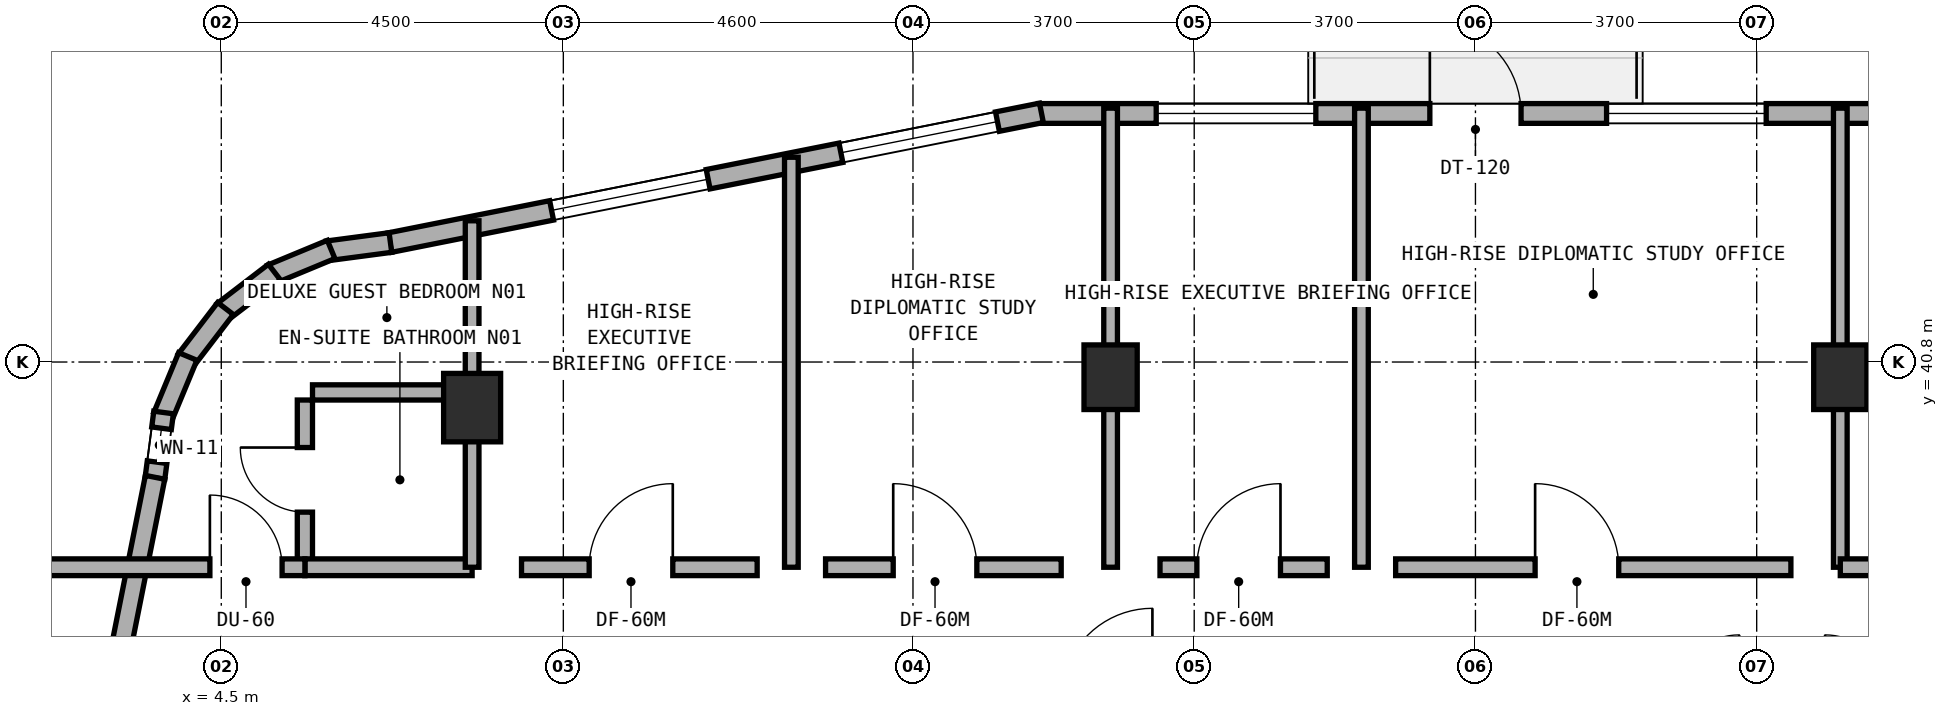
"""IFC4 building model, lengths in metres.
Left out: names, types, materials, properties, quantities, classifications, styles, units other than length and angle.
Written with IfcOpenShell. Run it as: python <this file> out.ifc"""

import sys

from ifc_helpers import new_model, si_unit, direction, frame, frame_2d, origin, origin_2d, place, context, subcontext, project, spatial, rectangle, extrude, element, fill, save


model = new_model("IFC4")
c1 = context("Model", 3, precision=1e-05, world=origin(), true_north=direction((0.0, 1.0)))
c2 = subcontext(c1, "Body", "Model", "MODEL_VIEW")
j1 = project(units=[si_unit("LENGTHUNIT", "METRE"), si_unit("PLANEANGLEUNIT", "RADIAN")], contexts=[c1])
p1 = place(None, origin())
s1 = spatial("IfcSite", under=j1, at=p1, CompositionType="ELEMENT")
p2 = place(p1, origin())
s2 = spatial("IfcBuilding", under=s1, at=p2, CompositionType="ELEMENT")
p3 = place(p2, frame((0.0, 0.0, 231.5)))
s3 = spatial("IfcBuildingStorey", under=s2, at=p3, CompositionType="ELEMENT", Elevation=231.5)
for number, where, z_axis, x_axis in (
    (1, (16.2, 40.6, 0.0), (0.0, 0.0, 1.0), (1.0, 0.0, 0.0)),
    (2, (25.8, 40.6, 0.0), (0.0, 0.0, 1.0), (1.0, 0.0, 0.0)),
):
    element("IfcColumn", number, at=place(p3, frame(where, z_axis=z_axis, x_axis=x_axis)), inside=s3, PredefinedType="COLUMN", context=c2, shape_type="SweptSolid", body=[
        extrude(rectangle(XDim=0.7, YDim=0.85, at=origin_2d()), origin(), (0.0, 0.0, 1.0), 3.6),
    ])
p4 = place(p3, frame((7.8, 40.2, 0.0), z_axis=(0.0, 0.0, 1.0), x_axis=(1.0, 0.0, 0.0)))
e3 = element("IfcColumn", 3, at=p4, inside=s3, PredefinedType="COLUMN", context=c2, shape_type="SweptSolid", body=[
    extrude(rectangle(XDim=0.75, YDim=0.9, at=origin_2d()), origin(), (0.0, 0.0, 1.0), 3.6),
])
p5 = place(p3, frame((26.785, 44.07, 0.0), z_axis=(0.0, 0.0, 1.0), x_axis=(-1.0, 0.0, 0.0)))
e4 = element("IfcWall", 4, at=p5, inside=s3, PredefinedType="STANDARD", context=c2, shape_type="SweptSolid", body=[
    extrude(rectangle(XDim=11.535, YDim=0.26, at=frame_2d((5.768, 0.0))), origin(), (0.0, 0.0, 1.0), 3.32),
])
p6 = place(p5, frame((5.185, 0.0, 0.0)))
e5 = element("IfcOpeningElement", 5, at=p6, cuts=e4, PredefinedType="OPENING", context=c2, shape_type="SweptSolid", body=[
    extrude(rectangle(XDim=1.2, YDim=2.15, at=frame_2d((0.6, 1.075))), frame((0.0, 0.14, 0.0), z_axis=(0.0, -1.0, 0.0), x_axis=(1.0, 0.0, 0.0)), (0.0, 0.0, 1.0), 0.28),
])
p7 = place(p5, frame((1.96, 0.0, 0.85)))
e6 = element("IfcOpeningElement", 6, at=p7, cuts=e4, PredefinedType="OPENING", context=c2, shape_type="SweptSolid", body=[
    extrude(rectangle(XDim=2.1, YDim=1.5, at=frame_2d((1.05, 0.75))), frame((0.0, 0.14, 0.0), z_axis=(0.0, -1.0, 0.0), x_axis=(1.0, 0.0, 0.0)), (0.0, 0.0, 1.0), 0.28),
])
p8 = place(p5, frame((7.885, 0.0, 0.85)))
e7 = element("IfcOpeningElement", 7, at=p8, cuts=e4, PredefinedType="OPENING", context=c2, shape_type="SweptSolid", body=[
    extrude(rectangle(XDim=2.1, YDim=1.5, at=frame_2d((1.05, 0.75))), frame((0.0, 0.14, 0.0), z_axis=(0.0, -1.0, 0.0), x_axis=(1.0, 0.0, 0.0)), (0.0, 0.0, 1.0), 0.28),
])
p9 = place(p3, frame((15.29, 44.078, 0.0), z_axis=(0.0, 0.0, 1.0), x_axis=(-0.980752174324, -0.195256683773, 0.0)))
e8 = element("IfcWall", 8, at=p9, inside=s3, PredefinedType="STANDARD", context=c2, shape_type="SweptSolid", body=[
    extrude(rectangle(XDim=8.741, YDim=0.26, at=frame_2d((4.371, 0.0))), origin(), (0.0, 0.0, 1.0), 3.32),
])
p10 = place(p9, frame((0.59, 0.0, 0.85)))
e9 = element("IfcOpeningElement", 9, at=p10, cuts=e8, PredefinedType="OPENING", context=c2, shape_type="SweptSolid", body=[
    extrude(rectangle(XDim=2.1, YDim=1.5, at=frame_2d((1.05, 0.75))), frame((0.0, 0.14, 0.0), z_axis=(0.0, -1.0, 0.0), x_axis=(1.0, 0.0, 0.0)), (0.0, 0.0, 1.0), 0.28),
])
p11 = place(p9, frame((4.471, 0.0, 0.85)))
e10 = element("IfcOpeningElement", 10, at=p11, cuts=e8, PredefinedType="OPENING", context=c2, shape_type="SweptSolid", body=[
    extrude(rectangle(XDim=2.1, YDim=1.5, at=frame_2d((1.05, 0.75))), frame((0.0, 0.14, 0.0), z_axis=(0.0, -1.0, 0.0), x_axis=(1.0, 0.0, 0.0)), (0.0, 0.0, 1.0), 0.28),
])
p12 = place(p3, frame((6.725, 42.372, 0.0), z_axis=(0.0, 0.0, 1.0), x_axis=(-0.9913883573, -0.130954667764, 0.0)))
e11 = element("IfcWall", 11, at=p12, inside=s3, PredefinedType="STANDARD", context=c2, shape_type="SweptSolid", body=[
    extrude(rectangle(XDim=0.833, YDim=0.26, at=frame_2d((0.417, 0.0))), origin(), (0.0, 0.0, 1.0), 3.32),
])
p13 = place(p3, frame((5.945, 42.281, 0.0), z_axis=(0.0, 0.0, 1.0), x_axis=(-0.923754491172, -0.382985169477, 0.0)))
e12 = element("IfcWall", 12, at=p13, inside=s3, PredefinedType="STANDARD", context=c2, shape_type="SweptSolid", body=[
    extrude(rectangle(XDim=0.851, YDim=0.26, at=frame_2d((0.426, 0.0))), origin(), (0.0, 0.0, 1.0), 3.32),
])
for number, where, z_axis, x_axis in (
    (13, (5.199, 41.983, 0.0), (0.0, 0.0, 1.0), (-0.794, -0.608, 0.0)),
    (14, (4.555, 41.504, 0.0), (0.0, 0.0, 1.0), (-0.608, -0.794, 0.0)),
):
    element("IfcWall", number, at=place(p3, frame(where, z_axis=z_axis, x_axis=x_axis)), inside=s3, PredefinedType="STANDARD", context=c2, shape_type="SweptSolid", body=[
        extrude(rectangle(XDim=0.85, YDim=0.26, at=frame_2d((0.425, 0.0))), origin(), (0.0, 0.0, 1.0), 3.32),
    ])
p14 = place(p3, frame((4.059, 40.873, 0.0), z_axis=(0.0, 0.0, 1.0), x_axis=(-0.383229930484, -0.923652976167, 0.0)))
e15 = element("IfcWall", 15, at=p14, inside=s3, PredefinedType="STANDARD", context=c2, shape_type="SweptSolid", body=[
    extrude(rectangle(XDim=0.851, YDim=0.26, at=frame_2d((0.426, 0.0))), origin(), (0.0, 0.0, 1.0), 3.32),
])
p15 = place(p3, frame((3.741, 40.136, 0.0), z_axis=(0.0, 0.0, 1.0), x_axis=(-0.130156359936, -0.991493480548, 0.0)))
e16 = element("IfcWall", 16, at=p15, inside=s3, PredefinedType="STANDARD", context=c2, shape_type="SweptSolid", body=[
    extrude(rectangle(XDim=0.868, YDim=0.26, at=frame_2d((0.434, 0.0))), origin(), (0.0, 0.0, 1.0), 3.32),
])
p16 = place(p15, frame((0.209, 0.0, 0.85)))
e17 = element("IfcOpeningElement", 17, at=p16, cuts=e16, PredefinedType="OPENING", context=c2, shape_type="SweptSolid", body=[
    extrude(rectangle(XDim=0.45, YDim=1.5, at=frame_2d((0.225, 0.75))), frame((0.0, 0.14, 0.0), z_axis=(0.0, -1.0, 0.0), x_axis=(1.0, 0.0, 0.0)), (0.0, 0.0, 1.0), 0.28),
])
p17 = place(p3, frame((3.629, 39.283, 0.0), z_axis=(0.0, 0.0, 1.0), x_axis=(-0.195291715883, -0.980745199176, 0.0)))
e18 = element("IfcWall", 18, at=p17, inside=s3, PredefinedType="STANDARD", context=c2, shape_type="SweptSolid", body=[
    extrude(rectangle(XDim=8.771, YDim=0.26, at=frame_2d((4.385, 0.0))), origin(), (0.0, 0.0, 1.0), 3.32),
])
p18 = place(p17, frame((4.0, 0.0, 0.85)))
e19 = element("IfcOpeningElement", 19, at=p18, cuts=e18, PredefinedType="OPENING", context=c2, shape_type="SweptSolid", body=[
    extrude(rectangle(XDim=2.1, YDim=1.5, at=frame_2d((1.05, 0.75))), frame((0.0, 0.14, 0.0), z_axis=(0.0, -1.0, 0.0), x_axis=(1.0, 0.0, 0.0)), (0.0, 0.0, 1.0), 0.28),
])
p19 = place(p3, frame((5.6, 38.2, 0.0), z_axis=(0.0, 0.0, 1.0), x_axis=(0.0, 1.0, 0.0)))
e20 = element("IfcWall", 20, at=p19, inside=s3, PredefinedType="PLUMBINGWALL", context=c2, shape_type="SweptSolid", body=[
    extrude(rectangle(XDim=2.1, YDim=0.2, at=frame_2d((1.05, 0.0))), origin(), (0.0, 0.0, 1.0), 3.32),
])
p20 = place(p19, frame((0.625, 0.0, 0.0)))
e21 = element("IfcOpeningElement", 21, at=p20, cuts=e20, PredefinedType="OPENING", context=c2, shape_type="SweptSolid", body=[
    extrude(rectangle(XDim=0.85, YDim=2.1, at=frame_2d((0.425, 1.05))), frame((0.0, 0.11, 0.0), z_axis=(0.0, -1.0, 0.0), x_axis=(1.0, 0.0, 0.0)), (0.0, 0.0, 1.0), 0.22),
])
p21 = place(p3, frame((5.7, 40.4, 0.0), z_axis=(0.0, 0.0, 1.0), x_axis=(1.0, 0.0, 0.0)))
e22 = element("IfcWall", 22, at=p21, inside=s3, PredefinedType="PLUMBINGWALL", context=c2, shape_type="SweptSolid", body=[
    extrude(rectangle(XDim=2.0, YDim=0.2, at=frame_2d((1.0, 0.0))), origin(), (0.0, 0.0, 1.0), 3.32),
])
p22 = place(p3, frame((5.6, 38.1, 0.0), z_axis=(0.0, 0.0, 1.0), x_axis=(1.0, 0.0, 0.0)))
e23 = element("IfcWall", 23, at=p22, inside=s3, PredefinedType="SOLIDWALL", context=c2, shape_type="SweptSolid", body=[
    extrude(rectangle(XDim=2.2, YDim=0.22, at=frame_2d((1.1, 0.0))), origin(), (0.0, 0.0, 1.0), 2.745),
])
p23 = place(p3, frame((1.96, 38.1, 0.0), z_axis=(0.0, 0.0, 1.0), x_axis=(1.0, 0.0, 0.0)))
e24 = element("IfcWall", 24, at=p23, inside=s3, PredefinedType="SOLIDWALL", context=c2, shape_type="SweptSolid", body=[
    extrude(rectangle(XDim=3.64, YDim=0.22, at=frame_2d((1.82, 0.0))), origin(), (0.0, 0.0, 1.0), 3.32),
])
p24 = place(p23, frame((2.39, 0.0, 0.0)))
e25 = element("IfcOpeningElement", 25, at=p24, cuts=e24, PredefinedType="OPENING", context=c2, shape_type="SweptSolid", body=[
    extrude(rectangle(XDim=0.95, YDim=2.1, at=frame_2d((0.475, 1.05))), frame((0.0, 0.12, 0.0), z_axis=(0.0, -1.0, 0.0), x_axis=(1.0, 0.0, 0.0)), (0.0, 0.0, 1.0), 0.24),
])
p25 = place(p3, frame((7.8, 38.1, 0.0), z_axis=(0.0, 0.0, 1.0), x_axis=(0.0, 1.0, 0.0)))
e26 = element("IfcWall", 26, at=p25, inside=s3, PredefinedType="SOLIDWALL", context=c2, shape_type="SweptSolid", body=[
    extrude(rectangle(XDim=4.558, YDim=0.18, at=frame_2d((2.279, 0.0))), origin(), (0.0, 0.0, 1.0), 2.745),
])
p26 = place(p3, frame((12.0, 38.1, 0.0), z_axis=(0.0, 0.0, 1.0), x_axis=(0.0, 1.0, 0.0)))
e27 = element("IfcWall", 27, at=p26, inside=s3, PredefinedType="SOLIDWALL", context=c2, shape_type="SweptSolid", body=[
    extrude(rectangle(XDim=5.394, YDim=0.18, at=frame_2d((2.697, 0.0))), origin(), (0.0, 0.0, 1.0), 2.895),
])
p27 = place(p3, frame((8.45, 38.1, 0.0), z_axis=(0.0, 0.0, 1.0), x_axis=(1.0, 0.0, 0.0)))
e28 = element("IfcWall", 28, at=p27, inside=s3, PredefinedType="SOLIDWALL", context=c2, shape_type="SweptSolid", body=[
    extrude(rectangle(XDim=3.1, YDim=0.22, at=frame_2d((1.55, 0.0))), origin(), (0.0, 0.0, 1.0), 3.32),
])
p28 = place(p27, frame((0.89, 0.0, 0.0)))
e29 = element("IfcOpeningElement", 29, at=p28, cuts=e28, PredefinedType="OPENING", context=c2, shape_type="SweptSolid", body=[
    extrude(rectangle(XDim=1.1, YDim=2.1, at=frame_2d((0.55, 1.05))), frame((0.0, 0.12, 0.0), z_axis=(0.0, -1.0, 0.0), x_axis=(1.0, 0.0, 0.0)), (0.0, 0.0, 1.0), 0.24),
])
p29 = place(p3, frame((12.45, 38.1, 0.0), z_axis=(0.0, 0.0, 1.0), x_axis=(1.0, 0.0, 0.0)))
e30 = element("IfcWall", 30, at=p29, inside=s3, PredefinedType="SOLIDWALL", context=c2, shape_type="SweptSolid", body=[
    extrude(rectangle(XDim=3.1, YDim=0.22, at=frame_2d((1.55, 0.0))), origin(), (0.0, 0.0, 1.0), 3.32),
])
p30 = place(p29, frame((0.89, 0.0, 0.0)))
e31 = element("IfcOpeningElement", 31, at=p30, cuts=e30, PredefinedType="OPENING", context=c2, shape_type="SweptSolid", body=[
    extrude(rectangle(XDim=1.1, YDim=2.1, at=frame_2d((0.55, 1.05))), frame((0.0, 0.12, 0.0), z_axis=(0.0, -1.0, 0.0), x_axis=(1.0, 0.0, 0.0)), (0.0, 0.0, 1.0), 0.24),
])
p31 = place(p3, frame((16.2, 38.1, 0.0), z_axis=(0.0, 0.0, 1.0), x_axis=(0.0, 1.0, 0.0)))
e32 = element("IfcWall", 32, at=p31, inside=s3, PredefinedType="SOLIDWALL", context=c2, shape_type="SweptSolid", body=[
    extrude(rectangle(XDim=6.04, YDim=0.18, at=frame_2d((3.02, 0.0))), origin(), (0.0, 0.0, 1.0), 2.745),
])
p32 = place(p3, frame((19.5, 38.1, 0.0), z_axis=(0.0, 0.0, 1.0), x_axis=(0.0, 1.0, 0.0)))
e33 = element("IfcWall", 33, at=p32, inside=s3, PredefinedType="SOLIDWALL", context=c2, shape_type="SweptSolid", body=[
    extrude(rectangle(XDim=6.04, YDim=0.18, at=frame_2d((3.02, 0.0))), origin(), (0.0, 0.0, 1.0), 2.895),
])
p33 = place(p3, frame((16.85, 38.1, 0.0), z_axis=(0.0, 0.0, 1.0), x_axis=(1.0, 0.0, 0.0)))
e34 = element("IfcWall", 34, at=p33, inside=s3, PredefinedType="SOLIDWALL", context=c2, shape_type="SweptSolid", body=[
    extrude(rectangle(XDim=2.2, YDim=0.22, at=frame_2d((1.1, 0.0))), origin(), (0.0, 0.0, 1.0), 3.32),
])
p34 = place(p33, frame((0.485, 0.0, 0.0)))
e35 = element("IfcOpeningElement", 35, at=p34, cuts=e34, PredefinedType="OPENING", context=c2, shape_type="SweptSolid", body=[
    extrude(rectangle(XDim=1.1, YDim=2.1, at=frame_2d((0.55, 1.05))), frame((0.0, 0.12, 0.0), z_axis=(0.0, -1.0, 0.0), x_axis=(1.0, 0.0, 0.0)), (0.0, 0.0, 1.0), 0.24),
])
p35 = place(p3, frame((19.95, 38.1, 0.0), z_axis=(0.0, 0.0, 1.0), x_axis=(1.0, 0.0, 0.0)))
e36 = element("IfcWall", 36, at=p35, inside=s3, PredefinedType="SOLIDWALL", context=c2, shape_type="SweptSolid", body=[
    extrude(rectangle(XDim=5.2, YDim=0.22, at=frame_2d((2.6, 0.0))), origin(), (0.0, 0.0, 1.0), 3.32),
])
p36 = place(p35, frame((1.835, 0.0, 0.0)))
e37 = element("IfcOpeningElement", 37, at=p36, cuts=e36, PredefinedType="OPENING", context=c2, shape_type="SweptSolid", body=[
    extrude(rectangle(XDim=1.1, YDim=2.1, at=frame_2d((0.55, 1.05))), frame((0.0, 0.12, 0.0), z_axis=(0.0, -1.0, 0.0), x_axis=(1.0, 0.0, 0.0)), (0.0, 0.0, 1.0), 0.24),
])
p37 = place(p3, frame((25.8, 38.1, 0.0), z_axis=(0.0, 0.0, 1.0), x_axis=(0.0, 1.0, 0.0)))
e38 = element("IfcWall", 38, at=p37, inside=s3, PredefinedType="SOLIDWALL", context=c2, shape_type="SweptSolid", body=[
    extrude(rectangle(XDim=6.04, YDim=0.18, at=frame_2d((3.02, 0.0))), origin(), (0.0, 0.0, 1.0), 2.745),
])
p38 = place(p3, frame((25.8, 38.1, 0.0), z_axis=(0.0, 0.0, 1.0), x_axis=(1.0, 0.0, 0.0)))
e39 = element("IfcWall", 39, at=p38, inside=s3, PredefinedType="SOLIDWALL", context=c2, shape_type="SweptSolid", body=[
    extrude(rectangle(XDim=5.05, YDim=0.22, at=frame_2d((2.525, 0.0))), origin(), (0.0, 0.0, 1.0), 2.745),
])
p39 = place(p38, frame((2.05, 0.0, 0.0)))
e40 = element("IfcOpeningElement", 40, at=p39, cuts=e39, PredefinedType="OPENING", context=c2, shape_type="SweptSolid", body=[
    extrude(rectangle(XDim=0.95, YDim=2.1, at=frame_2d((0.475, 1.05))), frame((0.0, 0.12, 0.0), z_axis=(0.0, -1.0, 0.0), x_axis=(1.0, 0.0, 0.0)), (0.0, 0.0, 1.0), 0.24),
])
p40 = place(p6, frame((1.2, 0.0, 0.0), z_axis=(0.0, 0.0, 1.0), x_axis=(-1.0, 0.0, 0.0)))
e41 = element("IfcDoor", 41, at=p40, inside=s3, OperationType="SINGLE_SWING_LEFT", PredefinedType="DOOR", context=c2, shape_type="SweptSolid", body=[
    extrude(rectangle(XDim=1.2, YDim=2.15, at=frame_2d((0.6, 1.075))), frame((0.0, 0.025, 0.0), z_axis=(0.0, -1.0, 0.0), x_axis=(1.0, 0.0, 0.0)), (0.0, 0.0, 1.0), 0.05),
])
fill(e5, e41)
p41 = place(p7, origin())
e42 = element("IfcWindow", 42, at=p41, inside=s3, PartitioningType="SINGLE_PANEL", PredefinedType="WINDOW", context=c2, shape_type="SweptSolid", body=[
    extrude(rectangle(XDim=2.1, YDim=1.5, at=frame_2d((1.05, 0.75))), frame((0.0, 0.03, 0.0), z_axis=(0.0, -1.0, 0.0), x_axis=(1.0, 0.0, 0.0)), (0.0, 0.0, 1.0), 0.06),
])
fill(e6, e42)
p42 = place(p8, origin())
e43 = element("IfcWindow", 43, at=p42, inside=s3, PartitioningType="SINGLE_PANEL", PredefinedType="WINDOW", context=c2, shape_type="SweptSolid", body=[
    extrude(rectangle(XDim=2.1, YDim=1.5, at=frame_2d((1.05, 0.75))), frame((0.0, 0.03, 0.0), z_axis=(0.0, -1.0, 0.0), x_axis=(1.0, 0.0, 0.0)), (0.0, 0.0, 1.0), 0.06),
])
fill(e7, e43)
p43 = place(p10, origin())
e44 = element("IfcWindow", 44, at=p43, inside=s3, PartitioningType="SINGLE_PANEL", PredefinedType="WINDOW", context=c2, shape_type="SweptSolid", body=[
    extrude(rectangle(XDim=2.1, YDim=1.5, at=frame_2d((1.05, 0.75))), frame((0.0, 0.03, 0.0), z_axis=(0.0, -1.0, 0.0), x_axis=(1.0, 0.0, 0.0)), (0.0, 0.0, 1.0), 0.06),
])
fill(e9, e44)
p44 = place(p11, origin())
e45 = element("IfcWindow", 45, at=p44, inside=s3, PartitioningType="SINGLE_PANEL", PredefinedType="WINDOW", context=c2, shape_type="SweptSolid", body=[
    extrude(rectangle(XDim=2.1, YDim=1.5, at=frame_2d((1.05, 0.75))), frame((0.0, 0.03, 0.0), z_axis=(0.0, -1.0, 0.0), x_axis=(1.0, 0.0, 0.0)), (0.0, 0.0, 1.0), 0.06),
])
fill(e10, e45)
p45 = place(p16, origin())
e46 = element("IfcWindow", 46, at=p45, inside=s3, PartitioningType="SINGLE_PANEL", PredefinedType="WINDOW", context=c2, shape_type="SweptSolid", body=[
    extrude(rectangle(XDim=0.45, YDim=1.5, at=frame_2d((0.225, 0.75))), frame((0.0, 0.03, 0.0), z_axis=(0.0, -1.0, 0.0), x_axis=(1.0, 0.0, 0.0)), (0.0, 0.0, 1.0), 0.06),
])
fill(e17, e46)
p46 = place(p20, origin())
e47 = element("IfcDoor", 47, at=p46, inside=s3, OperationType="SINGLE_SWING_RIGHT", PredefinedType="DOOR", context=c2, shape_type="SweptSolid", body=[
    extrude(rectangle(XDim=0.85, YDim=2.1, at=frame_2d((0.425, 1.05))), frame((0.0, 0.025, 0.0), z_axis=(0.0, -1.0, 0.0), x_axis=(1.0, 0.0, 0.0)), (0.0, 0.0, 1.0), 0.05),
])
fill(e21, e47)
p47 = place(p24, origin())
e48 = element("IfcDoor", 48, at=p47, inside=s3, OperationType="SINGLE_SWING_LEFT", PredefinedType="DOOR", context=c2, shape_type="SweptSolid", body=[
    extrude(rectangle(XDim=0.95, YDim=2.1, at=frame_2d((0.475, 1.05))), frame((0.0, 0.025, 0.0), z_axis=(0.0, -1.0, 0.0), x_axis=(1.0, 0.0, 0.0)), (0.0, 0.0, 1.0), 0.05),
])
fill(e25, e48)
p48 = place(p28, origin())
e49 = element("IfcDoor", 49, at=p48, inside=s3, OperationType="SINGLE_SWING_RIGHT", PredefinedType="DOOR", context=c2, shape_type="SweptSolid", body=[
    extrude(rectangle(XDim=1.1, YDim=2.1, at=frame_2d((0.55, 1.05))), frame((0.0, 0.025, 0.0), z_axis=(0.0, -1.0, 0.0), x_axis=(1.0, 0.0, 0.0)), (0.0, 0.0, 1.0), 0.05),
])
fill(e29, e49)
p49 = place(p30, origin())
e50 = element("IfcDoor", 50, at=p49, inside=s3, OperationType="SINGLE_SWING_LEFT", PredefinedType="DOOR", context=c2, shape_type="SweptSolid", body=[
    extrude(rectangle(XDim=1.1, YDim=2.1, at=frame_2d((0.55, 1.05))), frame((0.0, 0.025, 0.0), z_axis=(0.0, -1.0, 0.0), x_axis=(1.0, 0.0, 0.0)), (0.0, 0.0, 1.0), 0.05),
])
fill(e31, e50)
p50 = place(p34, origin())
e51 = element("IfcDoor", 51, at=p50, inside=s3, OperationType="SINGLE_SWING_RIGHT", PredefinedType="DOOR", context=c2, shape_type="SweptSolid", body=[
    extrude(rectangle(XDim=1.1, YDim=2.1, at=frame_2d((0.55, 1.05))), frame((0.0, 0.025, 0.0), z_axis=(0.0, -1.0, 0.0), x_axis=(1.0, 0.0, 0.0)), (0.0, 0.0, 1.0), 0.05),
])
fill(e35, e51)
p51 = place(p36, origin())
e52 = element("IfcDoor", 52, at=p51, inside=s3, OperationType="SINGLE_SWING_LEFT", PredefinedType="DOOR", context=c2, shape_type="SweptSolid", body=[
    extrude(rectangle(XDim=1.1, YDim=2.1, at=frame_2d((0.55, 1.05))), frame((0.0, 0.025, 0.0), z_axis=(0.0, -1.0, 0.0), x_axis=(1.0, 0.0, 0.0)), (0.0, 0.0, 1.0), 0.05),
])
fill(e37, e52)
save(model, sys.argv[1])
